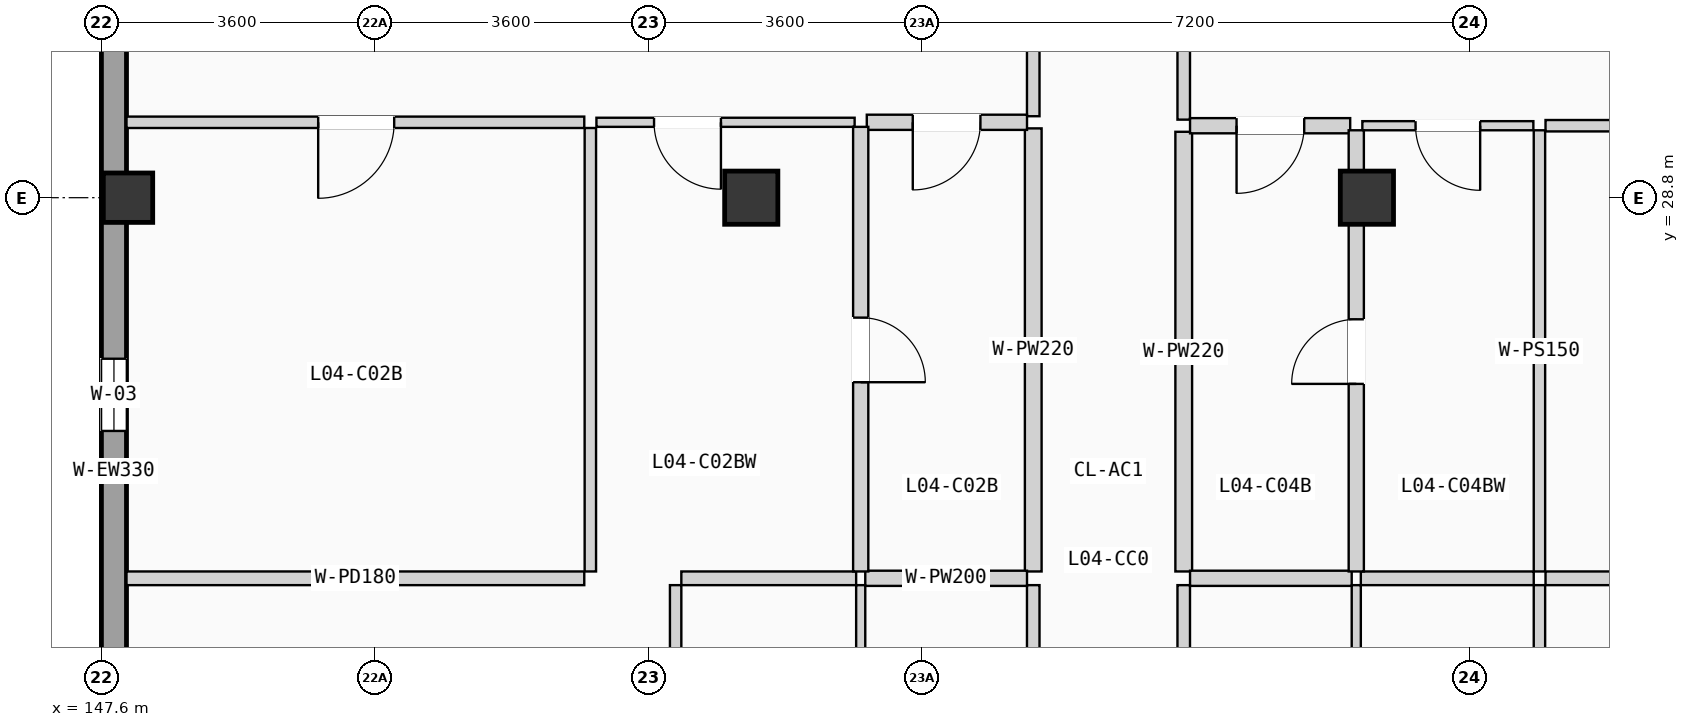
"""IFC4 building model, lengths in metres.
Left out: names, types, materials, properties, quantities, classifications, styles, units other than length and angle.
Written with IfcOpenShell. Run it as: python <this file> out.ifc"""

import sys

from ifc_helpers import new_model, si_unit, direction, frame, frame_2d, origin, origin_2d, place, context, subcontext, project, spatial, rectangle, extrude, element, fill, save


model = new_model("IFC4")
c1 = context("Model", 3, precision=1e-05, world=origin(), true_north=direction((0.0, 1.0)))
c2 = subcontext(c1, "Body", "Model", "MODEL_VIEW")
j1 = project(units=[si_unit("LENGTHUNIT", "METRE"), si_unit("PLANEANGLEUNIT", "RADIAN")], contexts=[c1])
p1 = place(None, origin())
s1 = spatial("IfcSite", under=j1, at=p1, CompositionType="ELEMENT")
p2 = place(p1, origin())
s2 = spatial("IfcBuilding", under=s1, at=p2, CompositionType="ELEMENT")
p3 = place(p2, frame((0.0, 0.0, 15.225)))
s3 = spatial("IfcBuildingStorey", under=s2, at=p3, CompositionType="ELEMENT", Elevation=15.225)
p4 = place(p3, frame((147.95, 28.8, 0.0), z_axis=(0.0, 0.0, 1.0), x_axis=(1.0, 0.0, 0.0)))
e1 = element("IfcColumn", 1, at=p4, inside=s3, PredefinedType="COLUMN", context=c2, shape_type="SweptSolid", body=[
    extrude(rectangle(XDim=0.65, YDim=0.65, at=origin_2d()), origin(), (0.0, 0.0, 1.0), 3.15),
])
for number, where, z_axis, x_axis in (
    (2, (156.15, 28.8, 0.0), (0.0, 0.0, 1.0), (1.0, 0.0, 0.0)),
    (3, (164.25, 28.8, 0.0), (0.0, 0.0, 1.0), (1.0, 0.0, 0.0)),
):
    element("IfcColumn", number, at=place(p3, frame(where, z_axis=z_axis, x_axis=x_axis)), inside=s3, PredefinedType="COLUMN", context=c2, shape_type="SweptSolid", body=[
        extrude(rectangle(XDim=0.7, YDim=0.7, at=origin_2d()), origin(), (0.0, 0.0, 1.0), 3.15),
    ])
p5 = place(p3, frame((147.765, 0.33, 0.0), z_axis=(0.0, 0.0, 1.0), x_axis=(0.0, 1.0, 0.0)))
e4 = element("IfcWall", 4, at=p5, inside=s3, PredefinedType="SOLIDWALL", context=c2, shape_type="SweptSolid", body=[
    extrude(rectangle(XDim=49.74, YDim=0.33, at=frame_2d((24.87, 0.0))), origin(), (0.0, 0.0, 1.0), 2.89),
])
p6 = place(p5, frame((15.17, 0.0, 0.555)))
e5 = element("IfcOpeningElement", 5, at=p6, cuts=e4, PredefinedType="OPENING", context=c2, shape_type="SweptSolid", body=[
    extrude(rectangle(XDim=2.3, YDim=1.65, at=frame_2d((1.15, 0.825))), frame((0.0, 0.175, 0.0), z_axis=(0.0, -1.0, 0.0), x_axis=(1.0, 0.0, 0.0)), (0.0, 0.0, 1.0), 0.35),
])
p7 = place(p5, frame((9.251, 0.0, 0.85)))
e6 = element("IfcOpeningElement", 6, at=p7, cuts=e4, PredefinedType="OPENING", context=c2, shape_type="SweptSolid", body=[
    extrude(rectangle(XDim=0.95, YDim=1.2, at=frame_2d((0.475, 0.6))), frame((0.0, 0.175, 0.0), z_axis=(0.0, -1.0, 0.0), x_axis=(1.0, 0.0, 0.0)), (0.0, 0.0, 1.0), 0.35),
])
p8 = place(p5, frame((19.255, 0.0, 0.9)))
e7 = element("IfcOpeningElement", 7, at=p8, cuts=e4, PredefinedType="OPENING", context=c2, shape_type="SweptSolid", body=[
    extrude(rectangle(XDim=0.95, YDim=1.2, at=frame_2d((0.475, 0.6))), frame((0.0, 0.175, 0.0), z_axis=(0.0, -1.0, 0.0), x_axis=(1.0, 0.0, 0.0)), (0.0, 0.0, 1.0), 0.35),
])
p9 = place(p5, frame((31.616, 0.0, 0.855)))
e8 = element("IfcOpeningElement", 8, at=p9, cuts=e4, PredefinedType="OPENING", context=c2, shape_type="SweptSolid", body=[
    extrude(rectangle(XDim=0.95, YDim=1.35, at=frame_2d((0.475, 0.675))), frame((0.0, 0.175, 0.0), z_axis=(0.0, -1.0, 0.0), x_axis=(1.0, 0.0, 0.0)), (0.0, 0.0, 1.0), 0.35),
])
p10 = place(p5, frame((25.401, 0.0, 0.705)))
e9 = element("IfcOpeningElement", 9, at=p10, cuts=e4, PredefinedType="OPENING", context=c2, shape_type="SweptSolid", body=[
    extrude(rectangle(XDim=0.95, YDim=1.5, at=frame_2d((0.475, 0.75))), frame((0.0, 0.175, 0.0), z_axis=(0.0, -1.0, 0.0), x_axis=(1.0, 0.0, 0.0)), (0.0, 0.0, 1.0), 0.35),
])
p11 = place(p5, frame((38.73, 0.0, 0.555)))
e10 = element("IfcOpeningElement", 10, at=p11, cuts=e4, PredefinedType="OPENING", context=c2, shape_type="SweptSolid", body=[
    extrude(rectangle(XDim=0.95, YDim=1.65, at=frame_2d((0.475, 0.825))), frame((0.0, 0.175, 0.0), z_axis=(0.0, -1.0, 0.0), x_axis=(1.0, 0.0, 0.0)), (0.0, 0.0, 1.0), 0.35),
])
p12 = place(p3, frame((159.86, 18.79, 0.0), z_axis=(0.0, 0.0, 1.0), x_axis=(0.0, 1.0, 0.0)))
e11 = element("IfcWall", 11, at=p12, inside=s3, PredefinedType="PARTITIONING", context=c2, shape_type="SweptSolid", body=[
    extrude(rectangle(XDim=4.912, YDim=0.165, at=frame_2d((2.456, 0.0))), origin(), (0.0, 0.0, 1.0), 2.87),
])
p13 = place(p3, frame((159.86, 29.872, 0.0), z_axis=(0.0, 0.0, 1.0), x_axis=(0.0, 1.0, 0.0)))
e12 = element("IfcWall", 12, at=p13, inside=s3, PredefinedType="PARTITIONING", context=c2, shape_type="SweptSolid", body=[
    extrude(rectangle(XDim=5.098, YDim=0.165, at=frame_2d((2.549, 0.0))), origin(), (0.0, 0.0, 1.0), 2.87),
])
p14 = place(p13, frame((2.024, 0.0, 0.0)))
e13 = element("IfcOpeningElement", 13, at=p14, cuts=e12, PredefinedType="OPENING", context=c2, shape_type="SweptSolid", body=[
    extrude(rectangle(XDim=1.05, YDim=2.13, at=frame_2d((0.525, 1.065))), frame((0.0, 0.093, 0.0), z_axis=(0.0, -1.0, 0.0), x_axis=(1.0, 0.0, 0.0)), (0.0, 0.0, 1.0), 0.185),
])
p15 = place(p3, frame((159.86, 23.882, 0.0), z_axis=(0.0, 0.0, 1.0), x_axis=(0.0, 1.0, 0.0)))
e14 = element("IfcWall", 14, at=p15, inside=s3, PredefinedType="PLUMBINGWALL", context=c2, shape_type="SweptSolid", body=[
    extrude(rectangle(XDim=5.83, YDim=0.22, at=frame_2d((2.915, 0.0))), origin(), (0.0, 0.0, 1.0), 2.87),
])
p16 = place(p3, frame((161.84, 18.79, 0.0), z_axis=(0.0, 0.0, 1.0), x_axis=(0.0, 1.0, 0.0)))
e15 = element("IfcWall", 15, at=p16, inside=s3, PredefinedType="PARTITIONING", context=c2, shape_type="SweptSolid", body=[
    extrude(rectangle(XDim=4.912, YDim=0.165, at=frame_2d((2.456, 0.0))), origin(), (0.0, 0.0, 1.0), 2.87),
])
p17 = place(p3, frame((161.84, 29.827, 0.0), z_axis=(0.0, 0.0, 1.0), x_axis=(0.0, 1.0, 0.0)))
e16 = element("IfcWall", 16, at=p17, inside=s3, PredefinedType="PARTITIONING", context=c2, shape_type="SweptSolid", body=[
    extrude(rectangle(XDim=7.028, YDim=0.165, at=frame_2d((3.514, 0.0))), origin(), (0.0, 0.0, 1.0), 2.87),
])
p18 = place(p17, frame((2.989, 0.0, 0.0)))
e17 = element("IfcOpeningElement", 17, at=p18, cuts=e16, PredefinedType="OPENING", context=c2, shape_type="SweptSolid", body=[
    extrude(rectangle(XDim=1.05, YDim=2.13, at=frame_2d((0.525, 1.065))), frame((0.0, 0.093, 0.0), z_axis=(0.0, -1.0, 0.0), x_axis=(1.0, 0.0, 0.0)), (0.0, 0.0, 1.0), 0.185),
])
p19 = place(p3, frame((161.84, 23.882, 0.0), z_axis=(0.0, 0.0, 1.0), x_axis=(0.0, 1.0, 0.0)))
e18 = element("IfcWall", 18, at=p19, inside=s3, PredefinedType="PLUMBINGWALL", context=c2, shape_type="SweptSolid", body=[
    extrude(rectangle(XDim=5.785, YDim=0.22, at=frame_2d((2.893, 0.0))), origin(), (0.0, 0.0, 1.0), 2.87),
])
p20 = place(p3, frame((157.59, 18.77, 0.0), z_axis=(0.0, 0.0, 1.0), x_axis=(0.0, 1.0, 0.0)))
e19 = element("IfcWall", 19, at=p20, inside=s3, PredefinedType="PARTITIONING", context=c2, shape_type="SweptSolid", body=[
    extrude(rectangle(XDim=4.932, YDim=0.12, at=frame_2d((2.466, 0.0))), origin(), (0.0, 0.0, 1.0), 2.87),
])
p21 = place(p3, frame((157.65, 23.792, 0.0), z_axis=(0.0, 0.0, 1.0), x_axis=(1.0, 0.0, 0.0)))
e20 = element("IfcWall", 20, at=p21, inside=s3, PredefinedType="PLUMBINGWALL", context=c2, shape_type="SweptSolid", body=[
    extrude(rectangle(XDim=2.128, YDim=0.2, at=frame_2d((1.064, 0.0))), origin(), (0.0, 0.0, 1.0), 2.87),
])
p22 = place(p3, frame((155.155, 18.77, 0.0), z_axis=(0.0, 0.0, 1.0), x_axis=(0.0, 1.0, 0.0)))
e21 = element("IfcWall", 21, at=p22, inside=s3, PredefinedType="PARTITIONING", context=c2, shape_type="SweptSolid", body=[
    extrude(rectangle(XDim=4.932, YDim=0.15, at=frame_2d((2.466, 0.0))), origin(), (0.0, 0.0, 1.0), 2.87),
])
p23 = place(p3, frame((147.93, 23.792, 0.0), z_axis=(0.0, 0.0, 1.0), x_axis=(1.0, 0.0, 0.0)))
e22 = element("IfcWall", 22, at=p23, inside=s3, PredefinedType="PARTITIONING", context=c2, shape_type="SweptSolid", body=[
    extrude(rectangle(XDim=6.023, YDim=0.18, at=frame_2d((3.011, 0.0))), origin(), (0.0, 0.0, 1.0), 2.87),
])
p24 = place(p3, frame((155.23, 23.792, 0.0), z_axis=(0.0, 0.0, 1.0), x_axis=(1.0, 0.0, 0.0)))
e23 = element("IfcWall", 23, at=p24, inside=s3, PredefinedType="PARTITIONING", context=c2, shape_type="SweptSolid", body=[
    extrude(rectangle(XDim=2.3, YDim=0.18, at=frame_2d((1.15, 0.0))), origin(), (0.0, 0.0, 1.0), 2.87),
])
p25 = place(p3, frame((157.67, 29.792, 0.0), z_axis=(0.0, 0.0, 1.0), x_axis=(1.0, 0.0, 0.0)))
e24 = element("IfcWall", 24, at=p25, inside=s3, PredefinedType="PLUMBINGWALL", context=c2, shape_type="SweptSolid", body=[
    extrude(rectangle(XDim=2.108, YDim=0.2, at=frame_2d((1.054, 0.0))), origin(), (0.0, 0.0, 1.0), 2.87),
])
p26 = place(p25, frame((0.605, 0.0, 0.0)))
e25 = element("IfcOpeningElement", 25, at=p26, cuts=e24, PredefinedType="OPENING", context=c2, shape_type="SweptSolid", body=[
    extrude(rectangle(XDim=0.89, YDim=2.03, at=frame_2d((0.445, 1.015))), frame((0.0, 0.11, 0.0), z_axis=(0.0, -1.0, 0.0), x_axis=(1.0, 0.0, 0.0)), (0.0, 0.0, 1.0), 0.22),
])
p27 = place(p3, frame((147.93, 29.792, 0.0), z_axis=(0.0, 0.0, 1.0), x_axis=(1.0, 0.0, 0.0)))
e26 = element("IfcWall", 26, at=p27, inside=s3, PredefinedType="PARTITIONING", context=c2, shape_type="SweptSolid", body=[
    extrude(rectangle(XDim=6.023, YDim=0.15, at=frame_2d((3.011, 0.0))), origin(), (0.0, 0.0, 1.0), 2.87),
])
p28 = place(p27, frame((2.522, 0.0, 0.0)))
e27 = element("IfcOpeningElement", 27, at=p28, cuts=e26, PredefinedType="OPENING", context=c2, shape_type="SweptSolid", body=[
    extrude(rectangle(XDim=1.0, YDim=2.06, at=frame_2d((0.5, 1.03))), frame((0.0, 0.085, 0.0), z_axis=(0.0, -1.0, 0.0), x_axis=(1.0, 0.0, 0.0)), (0.0, 0.0, 1.0), 0.17),
])
p29 = place(p3, frame((154.113, 29.792, 0.0), z_axis=(0.0, 0.0, 1.0), x_axis=(1.0, 0.0, 0.0)))
e28 = element("IfcWall", 28, at=p29, inside=s3, PredefinedType="PARTITIONING", context=c2, shape_type="SweptSolid", body=[
    extrude(rectangle(XDim=3.397, YDim=0.12, at=frame_2d((1.698, 0.0))), origin(), (0.0, 0.0, 1.0), 2.87),
])
p30 = place(p29, frame((0.758, 0.0, 0.0)))
e29 = element("IfcOpeningElement", 29, at=p30, cuts=e28, PredefinedType="OPENING", context=c2, shape_type="SweptSolid", body=[
    extrude(rectangle(XDim=0.88, YDim=2.02, at=frame_2d((0.44, 1.01))), frame((0.0, 0.07, 0.0), z_axis=(0.0, -1.0, 0.0), x_axis=(1.0, 0.0, 0.0)), (0.0, 0.0, 1.0), 0.14),
])
p31 = place(p3, frame((157.59, 23.882, 0.0), z_axis=(0.0, 0.0, 1.0), x_axis=(0.0, 1.0, 0.0)))
e30 = element("IfcWall", 30, at=p31, inside=s3, PredefinedType="PLUMBINGWALL", context=c2, shape_type="SweptSolid", body=[
    extrude(rectangle(XDim=5.85, YDim=0.2, at=frame_2d((2.925, 0.0))), origin(), (0.0, 0.0, 1.0), 2.87),
])
p32 = place(p31, frame((2.49, 0.0, 0.0)))
e31 = element("IfcOpeningElement", 31, at=p32, cuts=e30, PredefinedType="OPENING", context=c2, shape_type="SweptSolid", body=[
    extrude(rectangle(XDim=0.85, YDim=2.01, at=frame_2d((0.425, 1.005))), frame((0.0, 0.11, 0.0), z_axis=(0.0, -1.0, 0.0), x_axis=(1.0, 0.0, 0.0)), (0.0, 0.0, 1.0), 0.22),
])
p33 = place(p3, frame((154.033, 23.882, 0.0), z_axis=(0.0, 0.0, 1.0), x_axis=(0.0, 1.0, 0.0)))
e32 = element("IfcWall", 32, at=p33, inside=s3, PredefinedType="PARTITIONING", context=c2, shape_type="SweptSolid", body=[
    extrude(rectangle(XDim=5.835, YDim=0.15, at=frame_2d((2.917, 0.0))), origin(), (0.0, 0.0, 1.0), 2.87),
])
p34 = place(p3, frame((164.11, 18.77, 0.0), z_axis=(0.0, 0.0, 1.0), x_axis=(0.0, 1.0, 0.0)))
e33 = element("IfcWall", 33, at=p34, inside=s3, PredefinedType="PARTITIONING", context=c2, shape_type="SweptSolid", body=[
    extrude(rectangle(XDim=4.932, YDim=0.12, at=frame_2d((2.466, 0.0))), origin(), (0.0, 0.0, 1.0), 2.87),
])
p35 = place(p3, frame((161.923, 23.792, 0.0), z_axis=(0.0, 0.0, 1.0), x_axis=(1.0, 0.0, 0.0)))
e34 = element("IfcWall", 34, at=p35, inside=s3, PredefinedType="PLUMBINGWALL", context=c2, shape_type="SweptSolid", body=[
    extrude(rectangle(XDim=2.127, YDim=0.2, at=frame_2d((1.063, 0.0))), origin(), (0.0, 0.0, 1.0), 2.87),
])
p36 = place(p3, frame((166.52, 18.77, 0.0), z_axis=(0.0, 0.0, 1.0), x_axis=(0.0, 1.0, 0.0)))
e35 = element("IfcWall", 35, at=p36, inside=s3, PredefinedType="PARTITIONING", context=c2, shape_type="SweptSolid", body=[
    extrude(rectangle(XDim=4.932, YDim=0.15, at=frame_2d((2.466, 0.0))), origin(), (0.0, 0.0, 1.0), 2.87),
])
p37 = place(p3, frame((166.6, 23.792, 0.0), z_axis=(0.0, 0.0, 1.0), x_axis=(1.0, 0.0, 0.0)))
e36 = element("IfcWall", 36, at=p37, inside=s3, PredefinedType="PARTITIONING", context=c2, shape_type="SweptSolid", body=[
    extrude(rectangle(XDim=5.87, YDim=0.18, at=frame_2d((2.935, 0.0))), origin(), (0.0, 0.0, 1.0), 2.87),
])
p38 = place(p3, frame((164.17, 23.792, 0.0), z_axis=(0.0, 0.0, 1.0), x_axis=(1.0, 0.0, 0.0)))
e37 = element("IfcWall", 37, at=p38, inside=s3, PredefinedType="PARTITIONING", context=c2, shape_type="SweptSolid", body=[
    extrude(rectangle(XDim=2.275, YDim=0.18, at=frame_2d((1.138, 0.0))), origin(), (0.0, 0.0, 1.0), 2.87),
])
p39 = place(p3, frame((161.923, 29.747, 0.0), z_axis=(0.0, 0.0, 1.0), x_axis=(1.0, 0.0, 0.0)))
e38 = element("IfcWall", 38, at=p39, inside=s3, PredefinedType="PLUMBINGWALL", context=c2, shape_type="SweptSolid", body=[
    extrude(rectangle(XDim=2.107, YDim=0.2, at=frame_2d((1.053, 0.0))), origin(), (0.0, 0.0, 1.0), 2.87),
])
p40 = place(p39, frame((0.612, 0.0, 0.0)))
e39 = element("IfcOpeningElement", 39, at=p40, cuts=e38, PredefinedType="OPENING", context=c2, shape_type="SweptSolid", body=[
    extrude(rectangle(XDim=0.89, YDim=2.03, at=frame_2d((0.445, 1.015))), frame((0.0, 0.11, 0.0), z_axis=(0.0, -1.0, 0.0), x_axis=(1.0, 0.0, 0.0)), (0.0, 0.0, 1.0), 0.22),
])
p41 = place(p3, frame((166.6, 29.747, 0.0), z_axis=(0.0, 0.0, 1.0), x_axis=(1.0, 0.0, 0.0)))
e40 = element("IfcWall", 40, at=p41, inside=s3, PredefinedType="PARTITIONING", context=c2, shape_type="SweptSolid", body=[
    extrude(rectangle(XDim=5.87, YDim=0.15, at=frame_2d((2.935, 0.0))), origin(), (0.0, 0.0, 1.0), 2.87),
])
p42 = place(p41, frame((2.475, 0.0, 0.0)))
e41 = element("IfcOpeningElement", 41, at=p42, cuts=e40, PredefinedType="OPENING", context=c2, shape_type="SweptSolid", body=[
    extrude(rectangle(XDim=0.9, YDim=2.04, at=frame_2d((0.45, 1.02))), frame((0.0, 0.085, 0.0), z_axis=(0.0, -1.0, 0.0), x_axis=(1.0, 0.0, 0.0)), (0.0, 0.0, 1.0), 0.17),
])
p43 = place(p3, frame((164.19, 29.747, 0.0), z_axis=(0.0, 0.0, 1.0), x_axis=(1.0, 0.0, 0.0)))
e42 = element("IfcWall", 42, at=p43, inside=s3, PredefinedType="PARTITIONING", context=c2, shape_type="SweptSolid", body=[
    extrude(rectangle(XDim=2.25, YDim=0.12, at=frame_2d((1.125, 0.0))), origin(), (0.0, 0.0, 1.0), 2.87),
])
p44 = place(p43, frame((0.7, 0.0, 0.0)))
e43 = element("IfcOpeningElement", 43, at=p44, cuts=e42, PredefinedType="OPENING", context=c2, shape_type="SweptSolid", body=[
    extrude(rectangle(XDim=0.85, YDim=2.01, at=frame_2d((0.425, 1.005))), frame((0.0, 0.07, 0.0), z_axis=(0.0, -1.0, 0.0), x_axis=(1.0, 0.0, 0.0)), (0.0, 0.0, 1.0), 0.14),
])
p45 = place(p3, frame((164.11, 23.882, 0.0), z_axis=(0.0, 0.0, 1.0), x_axis=(0.0, 1.0, 0.0)))
e44 = element("IfcWall", 44, at=p45, inside=s3, PredefinedType="PLUMBINGWALL", context=c2, shape_type="SweptSolid", body=[
    extrude(rectangle(XDim=5.805, YDim=0.2, at=frame_2d((2.902, 0.0))), origin(), (0.0, 0.0, 1.0), 2.87),
])
p46 = place(p45, frame((2.468, 0.0, 0.0)))
e45 = element("IfcOpeningElement", 45, at=p46, cuts=e44, PredefinedType="OPENING", context=c2, shape_type="SweptSolid", body=[
    extrude(rectangle(XDim=0.85, YDim=2.01, at=frame_2d((0.425, 1.005))), frame((0.0, 0.11, 0.0), z_axis=(0.0, -1.0, 0.0), x_axis=(1.0, 0.0, 0.0)), (0.0, 0.0, 1.0), 0.22),
])
p47 = place(p3, frame((166.52, 23.882, 0.0), z_axis=(0.0, 0.0, 1.0), x_axis=(0.0, 1.0, 0.0)))
e46 = element("IfcWall", 46, at=p47, inside=s3, PredefinedType="PARTITIONING", context=c2, shape_type="SweptSolid", body=[
    extrude(rectangle(XDim=5.805, YDim=0.15, at=frame_2d((2.902, 0.0))), origin(), (0.0, 0.0, 1.0), 2.87),
])
p48 = place(p10, origin())
e47 = element("IfcWindow", 47, at=p48, inside=s3, PartitioningType="SINGLE_PANEL", PredefinedType="WINDOW", context=c2, shape_type="SweptSolid", body=[
    extrude(rectangle(XDim=0.95, YDim=1.5, at=frame_2d((0.475, 0.75))), frame((0.0, 0.03, 0.0), z_axis=(0.0, -1.0, 0.0), x_axis=(1.0, 0.0, 0.0)), (0.0, 0.0, 1.0), 0.06),
])
fill(e9, e47)
p49 = place(p26, frame((0.89, 0.0, 0.0), z_axis=(0.0, 0.0, 1.0), x_axis=(-1.0, 0.0, 0.0)))
e48 = element("IfcDoor", 48, at=p49, inside=s3, OperationType="SINGLE_SWING_LEFT", PredefinedType="DOOR", context=c2, shape_type="SweptSolid", body=[
    extrude(rectangle(XDim=0.89, YDim=2.03, at=frame_2d((0.445, 1.015))), frame((0.0, 0.025, 0.0), z_axis=(0.0, -1.0, 0.0), x_axis=(1.0, 0.0, 0.0)), (0.0, 0.0, 1.0), 0.05),
])
fill(e25, e48)
p50 = place(p28, frame((1.0, 0.0, 0.0), z_axis=(0.0, 0.0, 1.0), x_axis=(-1.0, 0.0, 0.0)))
e49 = element("IfcDoor", 49, at=p50, inside=s3, OperationType="SINGLE_SWING_LEFT", PredefinedType="DOOR", context=c2, shape_type="SweptSolid", body=[
    extrude(rectangle(XDim=1.0, YDim=2.06, at=frame_2d((0.5, 1.03))), frame((0.0, 0.025, 0.0), z_axis=(0.0, -1.0, 0.0), x_axis=(1.0, 0.0, 0.0)), (0.0, 0.0, 1.0), 0.05),
])
fill(e27, e49)
p51 = place(p30, frame((0.88, 0.0, 0.0), z_axis=(0.0, 0.0, 1.0), x_axis=(-1.0, 0.0, 0.0)))
e50 = element("IfcDoor", 50, at=p51, inside=s3, OperationType="SINGLE_SWING_RIGHT", PredefinedType="DOOR", context=c2, shape_type="SweptSolid", body=[
    extrude(rectangle(XDim=0.88, YDim=2.02, at=frame_2d((0.44, 1.01))), frame((0.0, 0.025, 0.0), z_axis=(0.0, -1.0, 0.0), x_axis=(1.0, 0.0, 0.0)), (0.0, 0.0, 1.0), 0.05),
])
fill(e29, e50)
p52 = place(p32, frame((0.85, 0.0, 0.0), z_axis=(0.0, 0.0, 1.0), x_axis=(-1.0, 0.0, 0.0)))
e51 = element("IfcDoor", 51, at=p52, inside=s3, OperationType="SINGLE_SWING_LEFT", PredefinedType="DOOR", context=c2, shape_type="SweptSolid", body=[
    extrude(rectangle(XDim=0.85, YDim=2.01, at=frame_2d((0.425, 1.005))), frame((0.0, 0.025, 0.0), z_axis=(0.0, -1.0, 0.0), x_axis=(1.0, 0.0, 0.0)), (0.0, 0.0, 1.0), 0.05),
])
fill(e31, e51)
p53 = place(p40, frame((0.89, 0.0, 0.0), z_axis=(0.0, 0.0, 1.0), x_axis=(-1.0, 0.0, 0.0)))
e52 = element("IfcDoor", 52, at=p53, inside=s3, OperationType="SINGLE_SWING_LEFT", PredefinedType="DOOR", context=c2, shape_type="SweptSolid", body=[
    extrude(rectangle(XDim=0.89, YDim=2.03, at=frame_2d((0.445, 1.015))), frame((0.0, 0.025, 0.0), z_axis=(0.0, -1.0, 0.0), x_axis=(1.0, 0.0, 0.0)), (0.0, 0.0, 1.0), 0.05),
])
fill(e39, e52)
p54 = place(p44, frame((0.85, 0.0, 0.0), z_axis=(0.0, 0.0, 1.0), x_axis=(-1.0, 0.0, 0.0)))
e53 = element("IfcDoor", 53, at=p54, inside=s3, OperationType="SINGLE_SWING_RIGHT", PredefinedType="DOOR", context=c2, shape_type="SweptSolid", body=[
    extrude(rectangle(XDim=0.85, YDim=2.01, at=frame_2d((0.425, 1.005))), frame((0.0, 0.025, 0.0), z_axis=(0.0, -1.0, 0.0), x_axis=(1.0, 0.0, 0.0)), (0.0, 0.0, 1.0), 0.05),
])
fill(e43, e53)
p55 = place(p46, origin())
e54 = element("IfcDoor", 54, at=p55, inside=s3, OperationType="SINGLE_SWING_LEFT", PredefinedType="DOOR", context=c2, shape_type="SweptSolid", body=[
    extrude(rectangle(XDim=0.85, YDim=2.01, at=frame_2d((0.425, 1.005))), frame((0.0, 0.025, 0.0), z_axis=(0.0, -1.0, 0.0), x_axis=(1.0, 0.0, 0.0)), (0.0, 0.0, 1.0), 0.05),
])
fill(e45, e54)
save(model, sys.argv[1])
